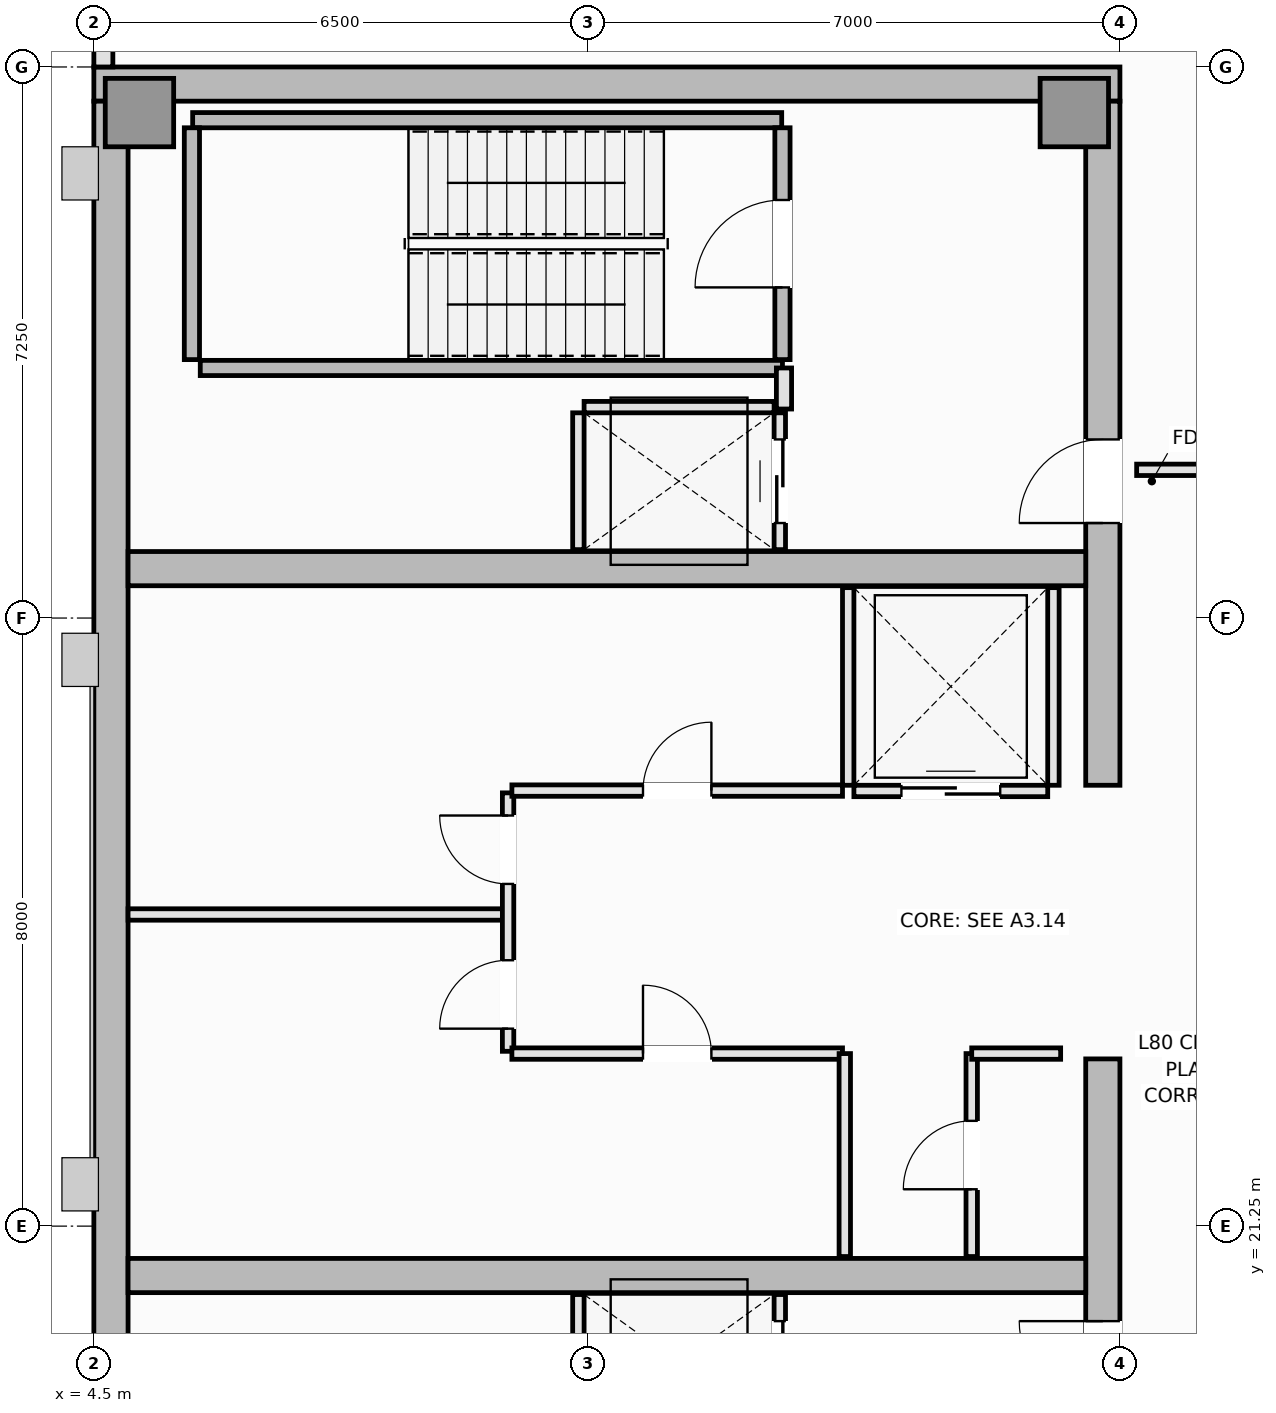
"""IFC4 building model, lengths in metres.
Left out: names, types, materials, properties, quantities, classifications, styles, units other than length and angle.
Written with IfcOpenShell. Run it as: python <this file> out.ifc"""

import sys

from ifc_helpers import new_model, si_unit, direction, frame, frame_2d, origin, origin_2d, place, context, subcontext, project, spatial, rectangle, extrude, element, fill, save


model = new_model("IFC4")
c1 = context("Model", 3, precision=1e-05, world=origin(), true_north=direction((0.0, 1.0)))
c2 = subcontext(c1, "Body", "Model", "MODEL_VIEW")
j1 = project(units=[si_unit("LENGTHUNIT", "METRE"), si_unit("PLANEANGLEUNIT", "RADIAN")], contexts=[c1])
p1 = place(None, origin())
s1 = spatial("IfcSite", under=j1, at=p1, CompositionType="ELEMENT")
p2 = place(p1, origin())
s2 = spatial("IfcBuilding", under=s1, at=p2, CompositionType="ELEMENT")
p3 = place(p2, frame((0.0, 0.0, 303.05)))
s3 = spatial("IfcBuildingStorey", under=s2, at=p3, CompositionType="ELEMENT", Elevation=303.05)
p4 = place(p3, frame((4.5, 36.275, 0.0), z_axis=(0.0, 0.0, 1.0), x_axis=(1.0, 0.0, 0.0)))
e1 = element("IfcWall", 1, at=p4, inside=s3, PredefinedType="SHEAR", context=c2, shape_type="SweptSolid", body=[
    extrude(rectangle(XDim=13.5, YDim=0.45, at=frame_2d((6.75, 0.0))), origin(), (0.0, 0.0, 1.0), 4.5),
])
p5 = place(p3, frame((4.725, 14.45, 0.0), z_axis=(0.0, 0.0, 1.0), x_axis=(0.0, 1.0, 0.0)))
e2 = element("IfcWall", 2, at=p5, inside=s3, PredefinedType="SHEAR", context=c2, shape_type="SweptSolid", body=[
    extrude(rectangle(XDim=21.6, YDim=0.45, at=frame_2d((10.8, 0.0))), origin(), (0.0, 0.0, 1.0), 4.5),
])
p6 = place(p3, frame((17.775, 14.45, 0.0), z_axis=(0.0, 0.0, 1.0), x_axis=(0.0, 1.0, 0.0)))
e3 = element("IfcWall", 3, at=p6, inside=s3, PredefinedType="SHEAR", context=c2, shape_type="SweptSolid", body=[
    extrude(rectangle(XDim=9.0, YDim=0.45, at=frame_2d((4.5, 0.0))), origin(), (0.0, 0.0, 1.0), 4.5),
])
p7 = place(p6, frame((4.45, 0.0, 0.0)))
e4 = element("IfcOpeningElement", 4, at=p7, cuts=e3, PredefinedType="OPENING", context=c2, shape_type="SweptSolid", body=[
    extrude(rectangle(XDim=1.1, YDim=2.15, at=frame_2d((0.55, 1.075))), frame((0.0, 0.235, 0.0), z_axis=(0.0, -1.0, 0.0), x_axis=(1.0, 0.0, 0.0)), (0.0, 0.0, 1.0), 0.47),
])
p8 = place(p3, frame((17.775, 27.05, 0.0), z_axis=(0.0, 0.0, 1.0), x_axis=(0.0, 1.0, 0.0)))
e5 = element("IfcWall", 5, at=p8, inside=s3, PredefinedType="SHEAR", context=c2, shape_type="SweptSolid", body=[
    extrude(rectangle(XDim=9.0, YDim=0.45, at=frame_2d((4.5, 0.0))), origin(), (0.0, 0.0, 1.0), 4.5),
])
p9 = place(p8, frame((3.45, 0.0, 0.0)))
e6 = element("IfcOpeningElement", 6, at=p9, cuts=e5, PredefinedType="OPENING", context=c2, shape_type="SweptSolid", body=[
    extrude(rectangle(XDim=1.1, YDim=2.15, at=frame_2d((0.55, 1.075))), frame((0.0, 0.235, 0.0), z_axis=(0.0, -1.0, 0.0), x_axis=(1.0, 0.0, 0.0)), (0.0, 0.0, 1.0), 0.47),
])
for number, where, z_axis, x_axis in (
    (7, (4.95, 20.6, 0.0), (0.0, 0.0, 1.0), (1.0, 0.0, 0.0)),
    (8, (4.95, 29.9, 0.0), (0.0, 0.0, 1.0), (1.0, 0.0, 0.0)),
):
    element("IfcWall", number, at=place(p3, frame(where, z_axis=z_axis, x_axis=x_axis)), inside=s3, PredefinedType="SHEAR", context=c2, shape_type="SweptSolid", body=[
        extrude(rectangle(XDim=12.6, YDim=0.45, at=frame_2d((6.3, 0.0))), origin(), (0.0, 0.0, 1.0), 4.5),
    ])
for number, where, z_axis, x_axis in (
    (9, (5.1, 35.9, 0.0), (0.0, 0.0, 1.0), (1.0, 0.0, 0.0)),
    (10, (17.4, 35.9, 0.0), (0.0, 0.0, 1.0), (1.0, 0.0, 0.0)),
):
    element("IfcColumn", number, at=place(p3, frame(where, z_axis=z_axis, x_axis=x_axis)), inside=s3, PredefinedType="PILASTER", context=c2, shape_type="SweptSolid", body=[
        extrude(rectangle(XDim=0.9, YDim=0.9, at=origin_2d()), origin(), (0.0, 0.0, 1.0), 4.5),
    ])
p10 = place(p3, frame((4.625, 42.0, 0.0), z_axis=(0.0, 0.0, 1.0), x_axis=(0.0, -1.0, 0.0)))
e11 = element("IfcWall", 11, at=p10, inside=s3, PredefinedType="SOLIDWALL", context=c2, shape_type="SweptSolid", body=[
    extrude(rectangle(XDim=5.5, YDim=0.25, at=frame_2d((2.75, 0.0))), origin(), (0.0, 0.0, 1.0), 4.3),
])
p11 = place(p3, frame((5.8, 35.8, 0.0), z_axis=(0.0, 0.0, 1.0), x_axis=(1.0, 0.0, 0.0)))
e12 = element("IfcWall", 12, at=p11, inside=s3, PredefinedType="SOLIDWALL", context=c2, shape_type="SweptSolid", body=[
    extrude(rectangle(XDim=7.75, YDim=0.2, at=frame_2d((3.875, 0.0))), origin(), (0.0, 0.0, 1.0), 4.5),
])
p12 = place(p3, frame((5.79, 32.65, 0.0), z_axis=(0.0, 0.0, 1.0), x_axis=(0.0, 1.0, 0.0)))
e13 = element("IfcWall", 13, at=p12, inside=s3, PredefinedType="SOLIDWALL", context=c2, shape_type="SweptSolid", body=[
    extrude(rectangle(XDim=3.05, YDim=0.2, at=frame_2d((1.525, 0.0))), origin(), (0.0, 0.0, 1.0), 4.5),
])
p13 = place(p3, frame((5.9, 32.54, 0.0), z_axis=(0.0, 0.0, 1.0), x_axis=(1.0, 0.0, 0.0)))
e14 = element("IfcWall", 14, at=p13, inside=s3, PredefinedType="SOLIDWALL", context=c2, shape_type="SweptSolid", body=[
    extrude(rectangle(XDim=7.66, YDim=0.2, at=frame_2d((3.83, 0.0))), origin(), (0.0, 0.0, 1.0), 4.5),
])
p14 = place(p3, frame((13.56, 32.65, 0.0), z_axis=(0.0, 0.0, 1.0), x_axis=(0.0, 1.0, 0.0)))
e15 = element("IfcWall", 15, at=p14, inside=s3, PredefinedType="SOLIDWALL", context=c2, shape_type="SweptSolid", body=[
    extrude(rectangle(XDim=3.05, YDim=0.2, at=frame_2d((1.525, 0.0))), origin(), (0.0, 0.0, 1.0), 4.5),
])
p15 = place(p14, frame((0.95, 0.0, 0.0)))
e16 = element("IfcOpeningElement", 16, at=p15, cuts=e15, PredefinedType="OPENING", context=c2, shape_type="SweptSolid", body=[
    extrude(rectangle(XDim=1.15, YDim=2.15, at=frame_2d((0.575, 1.075))), frame((0.0, 0.11, 0.0), z_axis=(0.0, -1.0, 0.0), x_axis=(1.0, 0.0, 0.0)), (0.0, 0.0, 1.0), 0.22),
])
p16 = place(p3, frame((14.5, 26.975, 0.0), z_axis=(0.0, 0.0, 1.0), x_axis=(1.0, 0.0, 0.0)))
e17 = element("IfcWall", 17, at=p16, inside=s3, PredefinedType="PARTITIONING", context=c2, shape_type="SweptSolid", body=[
    extrude(rectangle(XDim=2.55, YDim=0.15, at=frame_2d((1.275, 0.0))), origin(), (0.0, 0.0, 1.0), 4.3),
])
p17 = place(p16, frame((0.625, 0.0, 0.0)))
e18 = element("IfcOpeningElement", 18, at=p17, cuts=e17, PredefinedType="OPENING", context=c2, shape_type="SweptSolid", body=[
    extrude(rectangle(XDim=1.3, YDim=2.2, at=frame_2d((0.65, 1.1))), frame((0.0, 0.085, 0.0), z_axis=(0.0, -1.0, 0.0), x_axis=(1.0, 0.0, 0.0)), (0.0, 0.0, 1.0), 0.17),
])
for number, where, z_axis, x_axis in (
    (19, (14.425, 27.05, 0.0), (0.0, 0.0, 1.0), (0.0, 1.0, 0.0)),
    (20, (17.125, 27.05, 0.0), (0.0, 0.0, 1.0), (0.0, 1.0, 0.0)),
):
    element("IfcWall", number, at=place(p3, frame(where, z_axis=z_axis, x_axis=x_axis)), inside=s3, PredefinedType="PARTITIONING", context=c2, shape_type="SweptSolid", body=[
        extrude(rectangle(XDim=2.6, YDim=0.15, at=frame_2d((1.3, 0.0))), origin(), (0.0, 0.0, 1.0), 4.3),
    ])
p18 = place(p3, frame((10.875, 18.55, 0.0), z_axis=(0.0, 0.0, 1.0), x_axis=(0.0, 1.0, 0.0)))
e21 = element("IfcWall", 21, at=p18, inside=s3, PredefinedType="PARTITIONING", context=c2, shape_type="SweptSolid", body=[
    extrude(rectangle(XDim=1.8, YDim=0.15, at=frame_2d((0.9, 0.0))), origin(), (0.0, 0.0, 1.0), 4.3),
])
p19 = place(p3, frame((13.525, 18.55, 0.0), z_axis=(0.0, 0.0, 1.0), x_axis=(0.0, 1.0, 0.0)))
e22 = element("IfcWall", 22, at=p19, inside=s3, PredefinedType="PARTITIONING", context=c2, shape_type="SweptSolid", body=[
    extrude(rectangle(XDim=1.8, YDim=0.15, at=frame_2d((0.9, 0.0))), origin(), (0.0, 0.0, 1.0), 4.3),
])
p20 = place(p19, frame((0.35, 0.0, 0.0)))
e23 = element("IfcOpeningElement", 23, at=p20, cuts=e22, PredefinedType="OPENING", context=c2, shape_type="SweptSolid", body=[
    extrude(rectangle(XDim=1.1, YDim=2.2, at=frame_2d((0.55, 1.1))), frame((0.0, 0.085, 0.0), z_axis=(0.0, -1.0, 0.0), x_axis=(1.0, 0.0, 0.0)), (0.0, 0.0, 1.0), 0.17),
])
p21 = place(p3, frame((10.95, 32.025, 0.0), z_axis=(0.0, 0.0, 1.0), x_axis=(1.0, 0.0, 0.0)))
e24 = element("IfcWall", 24, at=p21, inside=s3, PredefinedType="PARTITIONING", context=c2, shape_type="SweptSolid", body=[
    extrude(rectangle(XDim=2.5, YDim=0.15, at=frame_2d((1.25, 0.0))), origin(), (0.0, 0.0, 1.0), 4.3),
])
p22 = place(p3, frame((10.875, 30.15, 0.0), z_axis=(0.0, 0.0, 1.0), x_axis=(0.0, 1.0, 0.0)))
e25 = element("IfcWall", 25, at=p22, inside=s3, PredefinedType="PARTITIONING", context=c2, shape_type="SweptSolid", body=[
    extrude(rectangle(XDim=1.8, YDim=0.15, at=frame_2d((0.9, 0.0))), origin(), (0.0, 0.0, 1.0), 4.3),
])
p23 = place(p3, frame((13.525, 30.15, 0.0), z_axis=(0.0, 0.0, 1.0), x_axis=(0.0, 1.0, 0.0)))
e26 = element("IfcWall", 26, at=p23, inside=s3, PredefinedType="PARTITIONING", context=c2, shape_type="SweptSolid", body=[
    extrude(rectangle(XDim=1.8, YDim=0.15, at=frame_2d((0.9, 0.0))), origin(), (0.0, 0.0, 1.0), 4.3),
])
p24 = place(p23, frame((0.35, 0.0, 0.0)))
e27 = element("IfcOpeningElement", 27, at=p24, cuts=e26, PredefinedType="OPENING", context=c2, shape_type="SweptSolid", body=[
    extrude(rectangle(XDim=1.1, YDim=2.2, at=frame_2d((0.55, 1.1))), frame((0.0, 0.085, 0.0), z_axis=(0.0, -1.0, 0.0), x_axis=(1.0, 0.0, 0.0)), (0.0, 0.0, 1.0), 0.17),
])
p25 = place(p3, frame((13.58, 32.0, 0.0), z_axis=(0.0, 0.0, 1.0), x_axis=(0.0, 1.0, 0.0)))
e28 = element("IfcWall", 28, at=p25, inside=s3, PredefinedType="PARTITIONING", context=c2, shape_type="SweptSolid", body=[
    extrude(rectangle(XDim=0.54, YDim=0.2, at=frame_2d((0.27, 0.0))), origin(), (0.0, 0.0, 1.0), 4.3),
])
p26 = place(p3, frame((4.95, 25.35, 0.0), z_axis=(0.0, 0.0, 1.0), x_axis=(1.0, 0.0, 0.0)))
e29 = element("IfcWall", 29, at=p26, inside=s3, PredefinedType="PARTITIONING", context=c2, shape_type="SweptSolid", body=[
    extrude(rectangle(XDim=5.0, YDim=0.15, at=frame_2d((2.5, 0.0))), origin(), (0.0, 0.0, 1.0), 4.3),
])
p27 = place(p3, frame((9.95, 23.55, 0.0), z_axis=(0.0, 0.0, 1.0), x_axis=(0.0, 1.0, 0.0)))
e30 = element("IfcWall", 30, at=p27, inside=s3, PredefinedType="PARTITIONING", context=c2, shape_type="SweptSolid", body=[
    extrude(rectangle(XDim=3.4, YDim=0.15, at=frame_2d((1.7, 0.0))), origin(), (0.0, 0.0, 1.0), 4.3),
])
p28 = place(p27, frame((0.298, 0.0, 0.0)))
e31 = element("IfcOpeningElement", 31, at=p28, cuts=e30, PredefinedType="OPENING", context=c2, shape_type="SweptSolid", body=[
    extrude(rectangle(XDim=0.9, YDim=2.1, at=frame_2d((0.45, 1.05))), frame((0.0, 0.085, 0.0), z_axis=(0.0, -1.0, 0.0), x_axis=(1.0, 0.0, 0.0)), (0.0, 0.0, 1.0), 0.17),
])
p29 = place(p27, frame((2.202, 0.0, 0.0)))
e32 = element("IfcOpeningElement", 32, at=p29, cuts=e30, PredefinedType="OPENING", context=c2, shape_type="SweptSolid", body=[
    extrude(rectangle(XDim=0.9, YDim=2.1, at=frame_2d((0.45, 1.05))), frame((0.0, 0.085, 0.0), z_axis=(0.0, -1.0, 0.0), x_axis=(1.0, 0.0, 0.0)), (0.0, 0.0, 1.0), 0.17),
])
p30 = place(p3, frame((10.0, 23.52, 0.0), z_axis=(0.0, 0.0, 1.0), x_axis=(1.0, 0.0, 0.0)))
e33 = element("IfcWall", 33, at=p30, inside=s3, PredefinedType="PARTITIONING", context=c2, shape_type="SweptSolid", body=[
    extrude(rectangle(XDim=4.35, YDim=0.15, at=frame_2d((2.175, 0.0))), origin(), (0.0, 0.0, 1.0), 4.3),
])
p31 = place(p30, frame((1.725, 0.0, 0.0)))
e34 = element("IfcOpeningElement", 34, at=p31, cuts=e33, PredefinedType="OPENING", context=c2, shape_type="SweptSolid", body=[
    extrude(rectangle(XDim=0.9, YDim=2.1, at=frame_2d((0.45, 1.05))), frame((0.0, 0.085, 0.0), z_axis=(0.0, -1.0, 0.0), x_axis=(1.0, 0.0, 0.0)), (0.0, 0.0, 1.0), 0.17),
])
p32 = place(p3, frame((10.0, 26.98, 0.0), z_axis=(0.0, 0.0, 1.0), x_axis=(1.0, 0.0, 0.0)))
e35 = element("IfcWall", 35, at=p32, inside=s3, PredefinedType="PARTITIONING", context=c2, shape_type="SweptSolid", body=[
    extrude(rectangle(XDim=4.35, YDim=0.15, at=frame_2d((2.175, 0.0))), origin(), (0.0, 0.0, 1.0), 4.3),
])
p33 = place(p32, frame((1.725, 0.0, 0.0)))
e36 = element("IfcOpeningElement", 36, at=p33, cuts=e35, PredefinedType="OPENING", context=c2, shape_type="SweptSolid", body=[
    extrude(rectangle(XDim=0.9, YDim=2.1, at=frame_2d((0.45, 1.05))), frame((0.0, 0.085, 0.0), z_axis=(0.0, -1.0, 0.0), x_axis=(1.0, 0.0, 0.0)), (0.0, 0.0, 1.0), 0.17),
])
p34 = place(p3, frame((14.38, 20.85, 0.0), z_axis=(0.0, 0.0, 1.0), x_axis=(0.0, 1.0, 0.0)))
e37 = element("IfcWall", 37, at=p34, inside=s3, PredefinedType="PARTITIONING", context=c2, shape_type="SweptSolid", body=[
    extrude(rectangle(XDim=2.67, YDim=0.15, at=frame_2d((1.335, 0.0))), origin(), (0.0, 0.0, 1.0), 4.3),
])
p35 = place(p3, frame((16.05, 20.85, 0.0), z_axis=(0.0, 0.0, 1.0), x_axis=(0.0, 1.0, 0.0)))
e38 = element("IfcWall", 38, at=p35, inside=s3, PredefinedType="PARTITIONING", context=c2, shape_type="SweptSolid", body=[
    extrude(rectangle(XDim=2.67, YDim=0.15, at=frame_2d((1.335, 0.0))), origin(), (0.0, 0.0, 1.0), 4.3),
])
p36 = place(p35, frame((0.885, 0.0, 0.0)))
e39 = element("IfcOpeningElement", 39, at=p36, cuts=e38, PredefinedType="OPENING", context=c2, shape_type="SweptSolid", body=[
    extrude(rectangle(XDim=0.9, YDim=2.1, at=frame_2d((0.45, 1.05))), frame((0.0, 0.085, 0.0), z_axis=(0.0, -1.0, 0.0), x_axis=(1.0, 0.0, 0.0)), (0.0, 0.0, 1.0), 0.17),
])
p37 = place(p3, frame((16.05, 23.52, 0.0), z_axis=(0.0, 0.0, 1.0), x_axis=(1.0, 0.0, 0.0)))
e40 = element("IfcWall", 40, at=p37, inside=s3, PredefinedType="PARTITIONING", context=c2, shape_type="SweptSolid", body=[
    extrude(rectangle(XDim=1.17, YDim=0.15, at=frame_2d((0.585, 0.0))), origin(), (0.0, 0.0, 1.0), 4.3),
])
p38 = place(p3, frame((18.22, 31.2, 0.0), z_axis=(0.0, 0.0, 1.0), x_axis=(1.0, 0.0, 0.0)))
e41 = element("IfcWall", 41, at=p38, inside=s3, PredefinedType="PARTITIONING", context=c2, shape_type="SweptSolid", body=[
    extrude(rectangle(XDim=1.8, YDim=0.15, at=frame_2d((0.9, 0.0))), origin(), (0.0, 0.0, 1.0), 4.3),
])
p39 = place(p15, origin())
e42 = element("IfcDoor", 42, at=p39, inside=s3, OperationType="SINGLE_SWING_LEFT", PredefinedType="DOOR", context=c2, shape_type="SweptSolid", body=[
    extrude(rectangle(XDim=1.15, YDim=2.15, at=frame_2d((0.575, 1.075))), frame((0.0, 0.025, 0.0), z_axis=(0.0, -1.0, 0.0), x_axis=(1.0, 0.0, 0.0)), (0.0, 0.0, 1.0), 0.05),
])
fill(e16, e42)
p40 = place(p17, origin())
e43 = element("IfcDoor", 43, at=p40, inside=s3, OperationType="DOUBLE_DOOR_SLIDING", PredefinedType="DOOR", context=c2, shape_type="SweptSolid", body=[
    extrude(rectangle(XDim=1.3, YDim=2.2, at=frame_2d((0.65, 1.1))), frame((0.0, 0.025, 0.0), z_axis=(0.0, -1.0, 0.0), x_axis=(1.0, 0.0, 0.0)), (0.0, 0.0, 1.0), 0.05),
])
fill(e18, e43)
p41 = place(p20, origin())
e44 = element("IfcDoor", 44, at=p41, inside=s3, OperationType="DOUBLE_DOOR_SLIDING", PredefinedType="DOOR", context=c2, shape_type="SweptSolid", body=[
    extrude(rectangle(XDim=1.1, YDim=2.2, at=frame_2d((0.55, 1.1))), frame((0.0, 0.025, 0.0), z_axis=(0.0, -1.0, 0.0), x_axis=(1.0, 0.0, 0.0)), (0.0, 0.0, 1.0), 0.05),
])
fill(e23, e44)
p42 = place(p24, origin())
e45 = element("IfcDoor", 45, at=p42, inside=s3, OperationType="DOUBLE_DOOR_SLIDING", PredefinedType="DOOR", context=c2, shape_type="SweptSolid", body=[
    extrude(rectangle(XDim=1.1, YDim=2.2, at=frame_2d((0.55, 1.1))), frame((0.0, 0.025, 0.0), z_axis=(0.0, -1.0, 0.0), x_axis=(1.0, 0.0, 0.0)), (0.0, 0.0, 1.0), 0.05),
])
fill(e27, e45)
p43 = place(p7, origin())
e46 = element("IfcDoor", 46, at=p43, inside=s3, OperationType="SINGLE_SWING_RIGHT", PredefinedType="DOOR", context=c2, shape_type="SweptSolid", body=[
    extrude(rectangle(XDim=1.1, YDim=2.15, at=frame_2d((0.55, 1.075))), frame((0.0, 0.025, 0.0), z_axis=(0.0, -1.0, 0.0), x_axis=(1.0, 0.0, 0.0)), (0.0, 0.0, 1.0), 0.05),
])
fill(e4, e46)
p44 = place(p9, origin())
e47 = element("IfcDoor", 47, at=p44, inside=s3, OperationType="SINGLE_SWING_LEFT", PredefinedType="DOOR", context=c2, shape_type="SweptSolid", body=[
    extrude(rectangle(XDim=1.1, YDim=2.15, at=frame_2d((0.55, 1.075))), frame((0.0, 0.025, 0.0), z_axis=(0.0, -1.0, 0.0), x_axis=(1.0, 0.0, 0.0)), (0.0, 0.0, 1.0), 0.05),
])
fill(e6, e47)
p45 = place(p28, origin())
e48 = element("IfcDoor", 48, at=p45, inside=s3, OperationType="SINGLE_SWING_LEFT", PredefinedType="DOOR", context=c2, shape_type="SweptSolid", body=[
    extrude(rectangle(XDim=0.9, YDim=2.1, at=frame_2d((0.45, 1.05))), frame((0.0, 0.025, 0.0), z_axis=(0.0, -1.0, 0.0), x_axis=(1.0, 0.0, 0.0)), (0.0, 0.0, 1.0), 0.05),
])
fill(e31, e48)
p46 = place(p29, origin())
e49 = element("IfcDoor", 49, at=p46, inside=s3, OperationType="SINGLE_SWING_RIGHT", PredefinedType="DOOR", context=c2, shape_type="SweptSolid", body=[
    extrude(rectangle(XDim=0.9, YDim=2.1, at=frame_2d((0.45, 1.05))), frame((0.0, 0.025, 0.0), z_axis=(0.0, -1.0, 0.0), x_axis=(1.0, 0.0, 0.0)), (0.0, 0.0, 1.0), 0.05),
])
fill(e32, e49)
p47 = place(p31, origin())
e50 = element("IfcDoor", 50, at=p47, inside=s3, OperationType="SINGLE_SWING_LEFT", PredefinedType="DOOR", context=c2, shape_type="SweptSolid", body=[
    extrude(rectangle(XDim=0.9, YDim=2.1, at=frame_2d((0.45, 1.05))), frame((0.0, 0.025, 0.0), z_axis=(0.0, -1.0, 0.0), x_axis=(1.0, 0.0, 0.0)), (0.0, 0.0, 1.0), 0.05),
])
fill(e34, e50)
p48 = place(p33, origin())
e51 = element("IfcDoor", 51, at=p48, inside=s3, OperationType="SINGLE_SWING_RIGHT", PredefinedType="DOOR", context=c2, shape_type="SweptSolid", body=[
    extrude(rectangle(XDim=0.9, YDim=2.1, at=frame_2d((0.45, 1.05))), frame((0.0, 0.025, 0.0), z_axis=(0.0, -1.0, 0.0), x_axis=(1.0, 0.0, 0.0)), (0.0, 0.0, 1.0), 0.05),
])
fill(e36, e51)
p49 = place(p36, origin())
e52 = element("IfcDoor", 52, at=p49, inside=s3, OperationType="SINGLE_SWING_LEFT", PredefinedType="DOOR", context=c2, shape_type="SweptSolid", body=[
    extrude(rectangle(XDim=0.9, YDim=2.1, at=frame_2d((0.45, 1.05))), frame((0.0, 0.025, 0.0), z_axis=(0.0, -1.0, 0.0), x_axis=(1.0, 0.0, 0.0)), (0.0, 0.0, 1.0), 0.05),
])
fill(e39, e52)
save(model, sys.argv[1])
